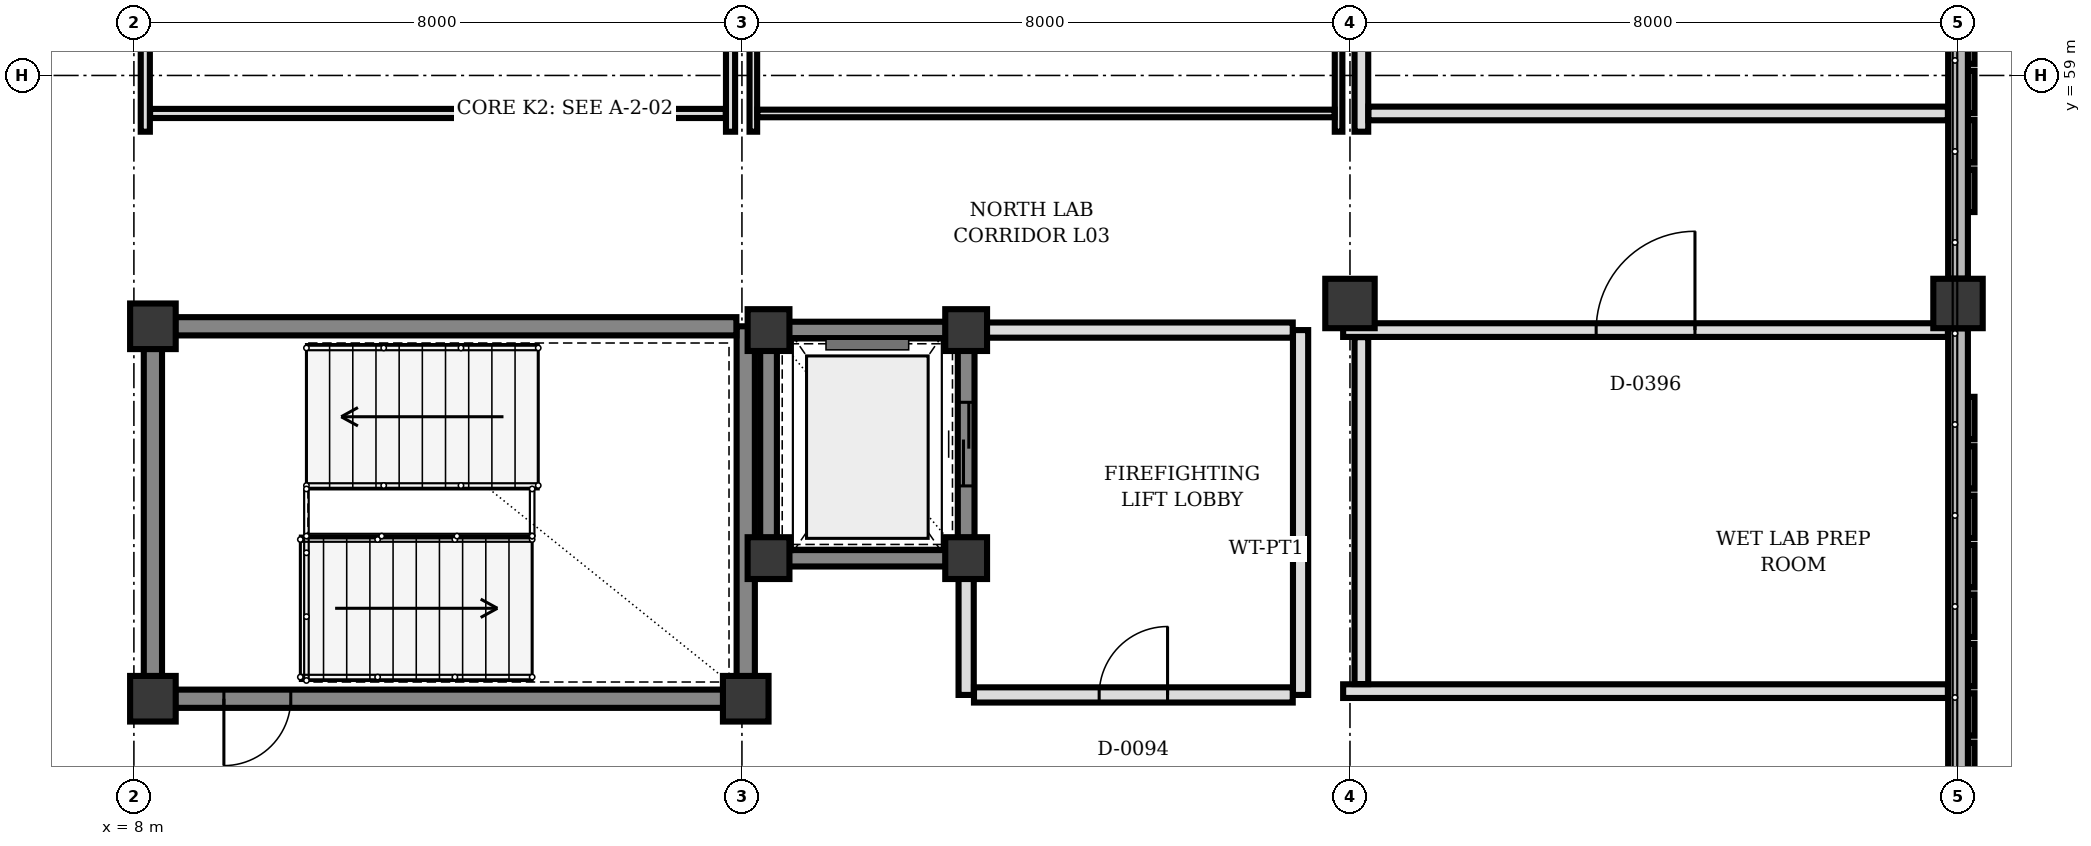
"""IFC4 building model, lengths in metres.
Left out: names, types, materials, properties, quantities, classifications, styles, units other than length and angle.
Written with IfcOpenShell. Run it as: python <this file> out.ifc"""

import sys

from ifc_helpers import new_model, si_unit, direction, frame, frame_2d, origin, origin_2d, place, context, subcontext, project, spatial, rectangle, extrude, element, fill, save


model = new_model("IFC4")
c1 = context("Model", 3, precision=1e-05, world=origin(), true_north=direction((0.0, 1.0)))
c2 = subcontext(c1, "Body", "Model", "MODEL_VIEW")
j1 = project(units=[si_unit("LENGTHUNIT", "METRE"), si_unit("PLANEANGLEUNIT", "RADIAN")], contexts=[c1])
p1 = place(None, origin())
s1 = spatial("IfcSite", under=j1, at=p1, CompositionType="ELEMENT")
p2 = place(p1, origin())
s2 = spatial("IfcBuilding", under=s1, at=p2, CompositionType="ELEMENT")
p3 = place(p2, frame((0.0, 0.0, 12.5)))
s3 = spatial("IfcBuildingStorey", under=s2, at=p3, CompositionType="ELEMENT", Elevation=12.5)
for number, where, z_axis, x_axis in (
    (1, (8.25, 50.8, 0.0), (0.0, 0.0, 1.0), (1.0, 0.0, 0.0)),
    (2, (16.05, 50.8, 0.0), (0.0, 0.0, 1.0), (1.0, 0.0, 0.0)),
    (3, (8.25, 55.7, 0.0), (0.0, 0.0, 1.0), (1.0, 0.0, 0.0)),
):
    element("IfcColumn", number, at=place(p3, frame(where, z_axis=z_axis, x_axis=x_axis)), inside=s3, PredefinedType="COLUMN", context=c2, shape_type="SweptSolid", body=[
        extrude(rectangle(XDim=0.6, YDim=0.6, at=origin_2d()), origin(), (0.0, 0.0, 1.0), 4.0),
    ])
for number, where, z_axis, x_axis in (
    (4, (16.35, 52.65, 0.0), (0.0, 0.0, 1.0), (1.0, 0.0, 0.0)),
    (5, (18.95, 52.65, 0.0), (0.0, 0.0, 1.0), (1.0, 0.0, 0.0)),
    (6, (18.95, 55.65, 0.0), (0.0, 0.0, 1.0), (1.0, 0.0, 0.0)),
    (7, (16.35, 55.65, 0.0), (0.0, 0.0, 1.0), (1.0, 0.0, 0.0)),
):
    element("IfcColumn", number, at=place(p3, frame(where, z_axis=z_axis, x_axis=x_axis)), inside=s3, PredefinedType="COLUMN", context=c2, shape_type="SweptSolid", body=[
        extrude(rectangle(XDim=0.55, YDim=0.55, at=origin_2d()), origin(), (0.0, 0.0, 1.0), 4.0),
    ])
for number, where, z_axis, x_axis in (
    (8, (24.0, 56.0, 0.0), (0.0, 0.0, 1.0), (1.0, 0.0, 0.0)),
    (9, (32.0, 56.0, 0.0), (0.0, 0.0, 1.0), (1.0, 0.0, 0.0)),
):
    element("IfcColumn", number, at=place(p3, frame(where, z_axis=z_axis, x_axis=x_axis)), inside=s3, PredefinedType="COLUMN", context=c2, shape_type="SweptSolid", body=[
        extrude(rectangle(XDim=0.65, YDim=0.65, at=origin_2d()), origin(), (0.0, 0.0, 1.0), 4.0),
    ])
p4 = place(p3, frame((32.0, 61.888, 0.0), z_axis=(0.0, 0.0, 1.0), x_axis=(0.0, -1.0, 0.0)))
e10 = element("IfcWall", 10, at=p4, inside=s3, PredefinedType="SOLIDWALL", context=c2, shape_type="SweptSolid", body=[
    extrude(rectangle(XDim=5.561, YDim=0.26, at=frame_2d((2.781, 0.0))), origin(), (0.0, 0.0, 1.0), 3.002),
])
p5 = place(p3, frame((32.0, 55.673, 0.0), z_axis=(0.0, 0.0, 1.0), x_axis=(0.0, -1.0, 0.0)))
e11 = element("IfcWall", 11, at=p5, inside=s3, PredefinedType="SOLIDWALL", context=c2, shape_type="SweptSolid", body=[
    extrude(rectangle(XDim=7.561, YDim=0.26, at=frame_2d((3.781, 0.0))), origin(), (0.0, 0.0, 1.0), 3.152),
])
p6 = place(p3, frame((8.25, 51.092, 0.0), z_axis=(0.0, 0.0, 1.0), x_axis=(0.0, 1.0, 0.0)))
e12 = element("IfcWall", 12, at=p6, inside=s3, PredefinedType="SHEAR", context=c2, shape_type="SweptSolid", body=[
    extrude(rectangle(XDim=4.316, YDim=0.24, at=frame_2d((2.158, 0.0))), origin(), (0.0, 0.0, 1.0), 3.74),
])
p7 = place(p3, frame((16.05, 55.7, 0.0), z_axis=(0.0, 0.0, 1.0), x_axis=(0.0, -1.0, 0.0)))
e13 = element("IfcWall", 13, at=p7, inside=s3, PredefinedType="SHEAR", context=c2, shape_type="SweptSolid", body=[
    extrude(rectangle(XDim=4.608, YDim=0.24, at=frame_2d((2.304, 0.0))), origin(), (0.0, 0.0, 1.0), 3.74),
])
p8 = place(p3, frame((15.758, 50.8, 0.0), z_axis=(0.0, 0.0, 1.0), x_axis=(-1.0, 0.0, 0.0)))
e14 = element("IfcWall", 14, at=p8, inside=s3, PredefinedType="SHEAR", context=c2, shape_type="SweptSolid", body=[
    extrude(rectangle(XDim=7.216, YDim=0.24, at=frame_2d((3.608, 0.0))), origin(), (0.0, 0.0, 1.0), 3.74),
])
p9 = place(p8, frame((5.694, 0.0, 0.0)))
e15 = element("IfcOpeningElement", 15, at=p9, cuts=e14, PredefinedType="OPENING", context=c2, shape_type="SweptSolid", body=[
    extrude(rectangle(XDim=0.88, YDim=2.1, at=frame_2d((0.44, 1.05))), frame((0.0, 0.13, 0.0), z_axis=(0.0, -1.0, 0.0), x_axis=(1.0, 0.0, 0.0)), (0.0, 0.0, 1.0), 0.26),
])
p10 = place(p3, frame((15.927, 55.7, 0.0), z_axis=(0.0, 0.0, 1.0), x_axis=(-1.0, 0.0, 0.0)))
e16 = element("IfcWall", 16, at=p10, inside=s3, PredefinedType="SHEAR", context=c2, shape_type="SweptSolid", body=[
    extrude(rectangle(XDim=7.385, YDim=0.24, at=frame_2d((3.692, 0.0))), origin(), (0.0, 0.0, 1.0), 3.74),
])
p11 = place(p3, frame((16.617, 52.65, 0.0), z_axis=(0.0, 0.0, 1.0), x_axis=(1.0, 0.0, 0.0)))
e17 = element("IfcWall", 17, at=p11, inside=s3, PredefinedType="SHEAR", context=c2, shape_type="SweptSolid", body=[
    extrude(rectangle(XDim=2.066, YDim=0.22, at=frame_2d((1.033, 0.0))), origin(), (0.0, 0.0, 1.0), 3.74),
])
p12 = place(p3, frame((18.95, 52.917, 0.0), z_axis=(0.0, 0.0, 1.0), x_axis=(0.0, 1.0, 0.0)))
e18 = element("IfcWall", 18, at=p12, inside=s3, PredefinedType="SHEAR", context=c2, shape_type="SweptSolid", body=[
    extrude(rectangle(XDim=2.466, YDim=0.22, at=frame_2d((1.233, 0.0))), origin(), (0.0, 0.0, 1.0), 3.74),
])
p13 = place(p12, frame((0.683, 0.0, 0.0)))
e19 = element("IfcOpeningElement", 19, at=p13, cuts=e18, PredefinedType="OPENING", context=c2, shape_type="SweptSolid", body=[
    extrude(rectangle(XDim=1.1, YDim=2.15, at=frame_2d((0.55, 1.075))), frame((0.0, 0.12, 0.0), z_axis=(0.0, -1.0, 0.0), x_axis=(1.0, 0.0, 0.0)), (0.0, 0.0, 1.0), 0.24),
])
p14 = place(p3, frame((18.683, 55.65, 0.0), z_axis=(0.0, 0.0, 1.0), x_axis=(-1.0, 0.0, 0.0)))
e20 = element("IfcWall", 20, at=p14, inside=s3, PredefinedType="SHEAR", context=c2, shape_type="SweptSolid", body=[
    extrude(rectangle(XDim=2.066, YDim=0.22, at=frame_2d((1.033, 0.0))), origin(), (0.0, 0.0, 1.0), 3.74),
])
p15 = place(p3, frame((16.35, 55.383, 0.0), z_axis=(0.0, 0.0, 1.0), x_axis=(0.0, -1.0, 0.0)))
e21 = element("IfcWall", 21, at=p15, inside=s3, PredefinedType="SHEAR", context=c2, shape_type="SweptSolid", body=[
    extrude(rectangle(XDim=2.466, YDim=0.22, at=frame_2d((1.233, 0.0))), origin(), (0.0, 0.0, 1.0), 3.74),
])
p16 = place(p3, frame((18.95, 50.85, 0.0), z_axis=(0.0, 0.0, 1.0), x_axis=(0.0, 1.0, 0.0)))
e22 = element("IfcWall", 22, at=p16, inside=s3, PredefinedType="PARTITIONING", context=c2, shape_type="SweptSolid", body=[
    extrude(rectangle(XDim=1.533, YDim=0.2, at=frame_2d((0.767, 0.0))), origin(), (0.0, 0.0, 1.0), 3.7),
])
p17 = place(p3, frame((23.35, 50.85, 0.0), z_axis=(0.0, 0.0, 1.0), x_axis=(0.0, 1.0, 0.0)))
e23 = element("IfcWall", 23, at=p17, inside=s3, PredefinedType="PARTITIONING", context=c2, shape_type="SweptSolid", body=[
    extrude(rectangle(XDim=4.8, YDim=0.2, at=frame_2d((2.4, 0.0))), origin(), (0.0, 0.0, 1.0), 3.7),
])
p18 = place(p3, frame((19.217, 55.65, 0.0), z_axis=(0.0, 0.0, 1.0), x_axis=(1.0, 0.0, 0.0)))
e24 = element("IfcWall", 24, at=p18, inside=s3, PredefinedType="PARTITIONING", context=c2, shape_type="SweptSolid", body=[
    extrude(rectangle(XDim=4.03, YDim=0.2, at=frame_2d((2.015, 0.0))), origin(), (0.0, 0.0, 1.0), 3.7),
])
p19 = place(p3, frame((19.053, 50.85, 0.0), z_axis=(0.0, 0.0, 1.0), x_axis=(1.0, 0.0, 0.0)))
e25 = element("IfcWall", 25, at=p19, inside=s3, PredefinedType="PARTITIONING", context=c2, shape_type="SweptSolid", body=[
    extrude(rectangle(XDim=4.194, YDim=0.2, at=frame_2d((2.097, 0.0))), origin(), (0.0, 0.0, 1.0), 3.7),
])
p20 = place(p19, frame((1.647, 0.0, 0.0)))
e26 = element("IfcOpeningElement", 26, at=p20, cuts=e25, PredefinedType="OPENING", context=c2, shape_type="SweptSolid", body=[
    extrude(rectangle(XDim=0.9, YDim=2.2, at=frame_2d((0.45, 1.1))), frame((0.0, 0.11, 0.0), z_axis=(0.0, -1.0, 0.0), x_axis=(1.0, 0.0, 0.0)), (0.0, 0.0, 1.0), 0.22),
])
p21 = place(p3, frame((15.85, 61.683, 0.0), z_axis=(0.0, 0.0, 1.0), x_axis=(0.0, -1.0, 0.0)))
e27 = element("IfcWall", 27, at=p21, inside=s3, PredefinedType="PARTITIONING", context=c2, shape_type="SweptSolid", body=[
    extrude(rectangle(XDim=3.423, YDim=0.12, at=frame_2d((1.711, 0.0))), origin(), (0.0, 0.0, 1.0), 3.002),
])
p22 = place(p3, frame((8.15, 58.26, 0.0), z_axis=(0.0, 0.0, 1.0), x_axis=(0.0, 1.0, 0.0)))
e28 = element("IfcWall", 28, at=p22, inside=s3, PredefinedType="PARTITIONING", context=c2, shape_type="SweptSolid", body=[
    extrude(rectangle(XDim=6.927, YDim=0.12, at=frame_2d((3.463, 0.0))), origin(), (0.0, 0.0, 1.0), 3.002),
])
p23 = place(p22, frame((2.469, 0.0, 0.0)))
e29 = element("IfcOpeningElement", 29, at=p23, cuts=e28, PredefinedType="OPENING", context=c2, shape_type="SweptSolid", body=[
    extrude(rectangle(XDim=0.88, YDim=2.1, at=frame_2d((0.44, 1.05))), frame((0.0, 0.07, 0.0), z_axis=(0.0, -1.0, 0.0), x_axis=(1.0, 0.0, 0.0)), (0.0, 0.0, 1.0), 0.14),
])
p24 = place(p3, frame((15.787, 58.5, 0.0), z_axis=(0.0, 0.0, 1.0), x_axis=(-1.0, 0.0, 0.0)))
e30 = element("IfcWall", 30, at=p24, inside=s3, PredefinedType="PARTITIONING", context=c2, shape_type="SweptSolid", body=[
    extrude(rectangle(XDim=7.574, YDim=0.12, at=frame_2d((3.787, 0.0))), origin(), (0.0, 0.0, 1.0), 3.7),
])
for number, where, z_axis, x_axis in (
    (31, (23.85, 61.683, 0.0), (0.0, 0.0, 1.0), (0.0, -1.0, 0.0)),
    (32, (16.15, 58.26, 0.0), (0.0, 0.0, 1.0), (0.0, 1.0, 0.0)),
):
    element("IfcWall", number, at=place(p3, frame(where, z_axis=z_axis, x_axis=x_axis)), inside=s3, PredefinedType="PARTITIONING", context=c2, shape_type="SweptSolid", body=[
        extrude(rectangle(XDim=3.423, YDim=0.1, at=frame_2d((1.711, 0.0))), origin(), (0.0, 0.0, 1.0), 3.002),
    ])
p25 = place(p3, frame((23.797, 58.5, 0.0), z_axis=(0.0, 0.0, 1.0), x_axis=(-1.0, 0.0, 0.0)))
e33 = element("IfcWall", 33, at=p25, inside=s3, PredefinedType="PARTITIONING", context=c2, shape_type="SweptSolid", body=[
    extrude(rectangle(XDim=7.594, YDim=0.1, at=frame_2d((3.797, 0.0))), origin(), (0.0, 0.0, 1.0), 3.152),
])
p26 = place(p3, frame((24.15, 58.26, 0.0), z_axis=(0.0, 0.0, 1.0), x_axis=(0.0, 1.0, 0.0)))
e34 = element("IfcWall", 34, at=p26, inside=s3, PredefinedType="PARTITIONING", context=c2, shape_type="SweptSolid", body=[
    extrude(rectangle(XDim=3.423, YDim=0.18, at=frame_2d((1.711, 0.0))), origin(), (0.0, 0.0, 1.0), 3.002),
])
p27 = place(p3, frame((31.867, 58.5, 0.0), z_axis=(0.0, 0.0, 1.0), x_axis=(-1.0, 0.0, 0.0)))
e35 = element("IfcWall", 35, at=p27, inside=s3, PredefinedType="PARTITIONING", context=c2, shape_type="SweptSolid", body=[
    extrude(rectangle(XDim=7.624, YDim=0.18, at=frame_2d((3.812, 0.0))), origin(), (0.0, 0.0, 1.0), 3.152),
])
p28 = place(p3, frame((23.91, 55.65, 0.0), z_axis=(0.0, 0.0, 1.0), x_axis=(1.0, 0.0, 0.0)))
e36 = element("IfcWall", 36, at=p28, inside=s3, PredefinedType="PARTITIONING", context=c2, shape_type="SweptSolid", body=[
    extrude(rectangle(XDim=7.957, YDim=0.18, at=frame_2d((3.979, 0.0))), origin(), (0.0, 0.0, 1.0), 3.002),
])
p29 = place(p28, frame((3.329, 0.0, 0.0)))
e37 = element("IfcOpeningElement", 37, at=p29, cuts=e36, PredefinedType="OPENING", context=c2, shape_type="SweptSolid", body=[
    extrude(rectangle(XDim=1.3, YDim=2.28, at=frame_2d((0.65, 1.14))), frame((0.0, 0.1, 0.0), z_axis=(0.0, -1.0, 0.0), x_axis=(1.0, 0.0, 0.0)), (0.0, 0.0, 1.0), 0.2),
])
p30 = place(p3, frame((31.867, 50.9, 0.0), z_axis=(0.0, 0.0, 1.0), x_axis=(-1.0, 0.0, 0.0)))
e38 = element("IfcWall", 38, at=p30, inside=s3, PredefinedType="PARTITIONING", context=c2, shape_type="SweptSolid", body=[
    extrude(rectangle(XDim=7.957, YDim=0.18, at=frame_2d((3.979, 0.0))), origin(), (0.0, 0.0, 1.0), 3.152),
])
p31 = place(p3, frame((24.15, 50.993, 0.0), z_axis=(0.0, 0.0, 1.0), x_axis=(0.0, 1.0, 0.0)))
e39 = element("IfcWall", 39, at=p31, inside=s3, PredefinedType="PARTITIONING", context=c2, shape_type="SweptSolid", body=[
    extrude(rectangle(XDim=4.564, YDim=0.18, at=frame_2d((2.282, 0.0))), origin(), (0.0, 0.0, 1.0), 3.152),
])
p32 = place(p9, origin())
e40 = element("IfcDoor", 40, at=p32, inside=s3, OperationType="SINGLE_SWING_RIGHT", PredefinedType="DOOR", context=c2, shape_type="SweptSolid", body=[
    extrude(rectangle(XDim=0.88, YDim=2.1, at=frame_2d((0.44, 1.05))), frame((0.0, 0.025, 0.0), z_axis=(0.0, -1.0, 0.0), x_axis=(1.0, 0.0, 0.0)), (0.0, 0.0, 1.0), 0.05),
])
fill(e15, e40)
p33 = place(p13, origin())
e41 = element("IfcDoor", 41, at=p33, inside=s3, OperationType="DOUBLE_DOOR_SLIDING", PredefinedType="DOOR", context=c2, shape_type="SweptSolid", body=[
    extrude(rectangle(XDim=1.1, YDim=2.15, at=frame_2d((0.55, 1.075))), frame((0.0, 0.025, 0.0), z_axis=(0.0, -1.0, 0.0), x_axis=(1.0, 0.0, 0.0)), (0.0, 0.0, 1.0), 0.05),
])
fill(e19, e41)
p34 = place(p20, origin())
e42 = element("IfcDoor", 42, at=p34, inside=s3, OperationType="SINGLE_SWING_RIGHT", PredefinedType="DOOR", context=c2, shape_type="SweptSolid", body=[
    extrude(rectangle(XDim=0.9, YDim=2.2, at=frame_2d((0.45, 1.1))), frame((0.0, 0.025, 0.0), z_axis=(0.0, -1.0, 0.0), x_axis=(1.0, 0.0, 0.0)), (0.0, 0.0, 1.0), 0.05),
])
fill(e26, e42)
p35 = place(p29, origin())
e43 = element("IfcDoor", 43, at=p35, inside=s3, OperationType="SINGLE_SWING_RIGHT", PredefinedType="DOOR", context=c2, shape_type="SweptSolid", body=[
    extrude(rectangle(XDim=1.3, YDim=2.28, at=frame_2d((0.65, 1.14))), frame((0.0, 0.025, 0.0), z_axis=(0.0, -1.0, 0.0), x_axis=(1.0, 0.0, 0.0)), (0.0, 0.0, 1.0), 0.05),
])
fill(e37, e43)
save(model, sys.argv[1])
